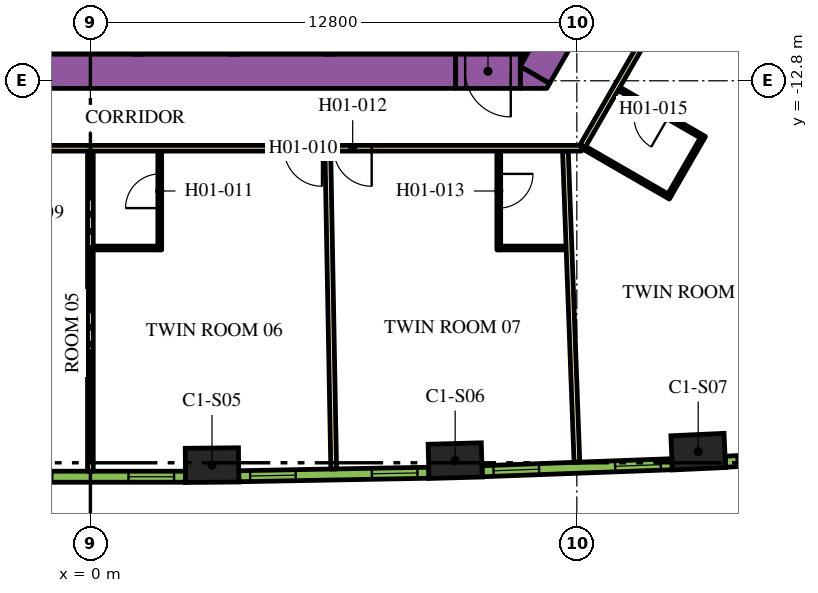
"""IFC4 building model, lengths in metres.
Left out: names, types, materials, properties, quantities, classifications, styles, units other than length and angle.
Written with IfcOpenShell. Run it as: python <this file> out.ifc"""

import sys

from ifc_helpers import new_model, si_unit, direction, frame, frame_2d, origin, origin_2d, place, context, subcontext, project, spatial, polyline, rectangle, outline, extrude, element, fill, save


model = new_model("IFC4")
c1 = context("Model", 3, precision=1e-05, world=origin(), true_north=direction((0.0, 1.0)))
c2 = subcontext(c1, "Body", "Model", "MODEL_VIEW")
j1 = project(units=[si_unit("LENGTHUNIT", "METRE"), si_unit("PLANEANGLEUNIT", "RADIAN")], contexts=[c1])
p1 = place(None, origin())
s1 = spatial("IfcSite", under=j1, at=p1, CompositionType="ELEMENT")
p2 = place(p1, origin())
s2 = spatial("IfcBuilding", under=s1, at=p2, CompositionType="ELEMENT")
p3 = place(p2, frame((0.0, 0.0, 35.4)))
s3 = spatial("IfcBuildingStorey", under=s2, at=p3, CompositionType="ELEMENT", Elevation=35.4)
for number, where, z_axis, x_axis in (
    (1, (3.2, -22.913, 0.0), (0.0, 0.0, 1.0), (1.0, 0.009, 0.0)),
    (2, (9.599, -22.795, 0.0), (0.0, 0.0, 1.0), (1.0, 0.028, 0.0)),
    (3, (15.994, -22.558, 0.0), (0.0, 0.0, 1.0), (0.999, 0.046, 0.0)),
):
    element("IfcColumn", number, at=place(p3, frame(where, z_axis=z_axis, x_axis=x_axis)), inside=s3, PredefinedType="COLUMN", context=c2, shape_type="SweptSolid", body=[
        extrude(rectangle(XDim=1.4, YDim=0.9, at=origin_2d()), origin(), (0.0, 0.0, 1.0), 3.9),
    ])
p4 = place(p3, frame((11.695, -12.644, 0.0), z_axis=(0.0, 0.0, 1.0), x_axis=(0.500010229568, 0.86601949766, 0.0)))
e4 = element("IfcWall", 4, at=p4, inside=s3, PredefinedType="SOLIDWALL", context=c2, shape_type="SweptSolid", body=[
    extrude(rectangle(XDim=9.326, YDim=0.9, at=frame_2d((4.663, 0.0))), origin(), (0.0, 0.0, 1.0), 3.9),
])
p5 = place(p3, origin())
e5 = element("IfcWall", 5, at=p5, inside=s3, PredefinedType="SOLIDWALL", context=c2, shape_type="SweptSolid", body=[
    extrude(outline(polyline([(12.009, -13.0), (11.312, -13.0), (11.312, -12.425), (12.083, -12.871), (12.009, -13.0)])), origin(), (0.0, 0.0, 1.0), 3.9),
])
e6 = element("IfcWall", 6, at=p5, inside=s3, PredefinedType="SOLIDWALL", context=c2, shape_type="SweptSolid", body=[
    extrude(outline(polyline([(11.489, -12.1), (11.312, -12.407), (11.312, -12.1), (11.489, -12.1)])), origin(), (0.0, 0.0, 1.0), 3.9),
])
p6 = place(p3, frame((-12.019, -12.55, 0.0), z_axis=(0.0, 0.0, 1.0), x_axis=(1.0, 0.0, 0.0)))
e7 = element("IfcWall", 7, at=p6, inside=s3, PredefinedType="SOLIDWALL", context=c2, shape_type="SweptSolid", body=[
    extrude(rectangle(XDim=21.63, YDim=0.9, at=frame_2d((10.815, 0.0))), origin(), (0.0, 0.0, 1.0), 3.9),
])
p7 = place(p3, frame((6.3, -8.67, 0.0), z_axis=(0.0, 0.0, 1.0), x_axis=(0.0, -1.0, 0.0)))
e8 = element("IfcWall", 8, at=p7, inside=s3, PredefinedType="SOLIDWALL", context=c2, shape_type="SweptSolid", body=[
    extrude(rectangle(XDim=3.43, YDim=0.25, at=frame_2d((1.715, 0.0))), origin(), (0.0, 0.0, 1.0), 3.9),
])
for number, where, z_axis, x_axis in (
    (9, (3.78, -12.1, 0.0), (0.0, 0.0, 1.0), (0.0, 1.0, 0.0)),
    (10, (1.26, -12.1, 0.0), (0.0, 0.0, 1.0), (0.0, 1.0, 0.0)),
):
    element("IfcWall", number, at=place(p3, frame(where, z_axis=z_axis, x_axis=x_axis)), inside=s3, PredefinedType="SOLIDWALL", context=c2, shape_type="SweptSolid", body=[
        extrude(rectangle(XDim=2.2, YDim=0.25, at=frame_2d((1.1, 0.0))), origin(), (0.0, 0.0, 1.0), 3.9),
    ])
p8 = place(p3, frame((11.312, -12.55, 0.0), z_axis=(0.0, 0.0, 1.0), x_axis=(-1.0, 0.0, 0.0)))
e11 = element("IfcWall", 11, at=p8, inside=s3, PredefinedType="SOLIDWALL", context=c2, shape_type="SweptSolid", body=[
    extrude(rectangle(XDim=1.7, YDim=0.9, at=frame_2d((0.85, 0.0))), origin(), (0.0, 0.0, 1.0), 3.9),
])
p9 = place(p8, frame((0.25, 0.0, 0.0)))
e12 = element("IfcOpeningElement", 12, at=p9, cuts=e11, PredefinedType="OPENING", context=c2, shape_type="SweptSolid", body=[
    extrude(rectangle(XDim=1.2, YDim=2.1, at=frame_2d((0.6, 1.05))), frame((0.0, 0.46, 0.0), z_axis=(0.0, -1.0, 0.0), x_axis=(1.0, 0.0, 0.0)), (0.0, 0.0, 1.0), 0.92),
])
p10 = place(p3, frame((16.412, -8.523, 0.0), z_axis=(0.0, 0.0, 1.0), x_axis=(0.866022197818, -0.500005552856, 0.0)))
e13 = element("IfcWall", 13, at=p10, inside=s3, PredefinedType="PARTITIONING", context=c2, shape_type="SweptSolid", body=[
    extrude(rectangle(XDim=16.224, YDim=0.15, at=frame_2d((8.112, 0.0))), origin(), (0.0, 0.0, 1.0), 2.75),
])
p11 = place(p10, frame((7.949, 0.0, 0.0)))
e14 = element("IfcOpeningElement", 14, at=p11, cuts=e13, PredefinedType="OPENING", context=c2, shape_type="SweptSolid", body=[
    extrude(rectangle(XDim=1.0, YDim=2.1, at=frame_2d((0.5, 1.05))), frame((0.0, 0.085, 0.0), z_axis=(0.0, -1.0, 0.0), x_axis=(1.0, 0.0, 0.0)), (0.0, 0.0, 1.0), 0.17),
])
p12 = place(p10, frame((0.526, 0.0, 0.0)))
e15 = element("IfcOpeningElement", 15, at=p12, cuts=e13, PredefinedType="OPENING", context=c2, shape_type="SweptSolid", body=[
    extrude(rectangle(XDim=1.0, YDim=2.1, at=frame_2d((0.5, 1.05))), frame((0.0, 0.085, 0.0), z_axis=(0.0, -1.0, 0.0), x_axis=(1.0, 0.0, 0.0)), (0.0, 0.0, 1.0), 0.17),
])
p13 = place(p3, frame((12.918, -14.575, 0.0), z_axis=(0.0, 0.0, 1.0), x_axis=(-1.0, 0.0, 0.0)))
e16 = element("IfcWall", 16, at=p13, inside=s3, PredefinedType="PARTITIONING", context=c2, shape_type="SweptSolid", body=[
    extrude(rectangle(XDim=25.766, YDim=0.15, at=frame_2d((12.883, 0.0))), origin(), (0.0, 0.0, 1.0), 2.75),
])
p14 = place(p13, frame((24.586, 0.0, 0.0)))
e17 = element("IfcOpeningElement", 17, at=p14, cuts=e16, PredefinedType="OPENING", context=c2, shape_type="SweptSolid", body=[
    extrude(rectangle(XDim=1.0, YDim=2.1, at=frame_2d((0.5, 1.05))), frame((0.0, 0.085, 0.0), z_axis=(0.0, -1.0, 0.0), x_axis=(1.0, 0.0, 0.0)), (0.0, 0.0, 1.0), 0.17),
])
p15 = place(p13, frame((16.195, 0.0, 0.0)))
e18 = element("IfcOpeningElement", 18, at=p15, cuts=e16, PredefinedType="OPENING", context=c2, shape_type="SweptSolid", body=[
    extrude(rectangle(XDim=1.0, YDim=2.1, at=frame_2d((0.5, 1.05))), frame((0.0, 0.085, 0.0), z_axis=(0.0, -1.0, 0.0), x_axis=(1.0, 0.0, 0.0)), (0.0, 0.0, 1.0), 0.17),
])
p16 = place(p13, frame((14.066, 0.0, 0.0)))
e19 = element("IfcOpeningElement", 19, at=p16, cuts=e16, PredefinedType="OPENING", context=c2, shape_type="SweptSolid", body=[
    extrude(rectangle(XDim=0.9, YDim=2.1, at=frame_2d((0.45, 1.05))), frame((0.0, 0.085, 0.0), z_axis=(0.0, -1.0, 0.0), x_axis=(1.0, 0.0, 0.0)), (0.0, 0.0, 1.0), 0.17),
])
p17 = place(p13, frame((6.824, 0.0, 0.0)))
e20 = element("IfcOpeningElement", 20, at=p17, cuts=e16, PredefinedType="OPENING", context=c2, shape_type="SweptSolid", body=[
    extrude(rectangle(XDim=1.0, YDim=2.1, at=frame_2d((0.5, 1.05))), frame((0.0, 0.085, 0.0), z_axis=(0.0, -1.0, 0.0), x_axis=(1.0, 0.0, 0.0)), (0.0, 0.0, 1.0), 0.17),
])
p18 = place(p13, frame((5.517, 0.0, 0.0)))
e21 = element("IfcOpeningElement", 21, at=p18, cuts=e16, PredefinedType="OPENING", context=c2, shape_type="SweptSolid", body=[
    extrude(rectangle(XDim=1.0, YDim=2.1, at=frame_2d((0.5, 1.05))), frame((0.0, 0.085, 0.0), z_axis=(0.0, -1.0, 0.0), x_axis=(1.0, 0.0, 0.0)), (0.0, 0.0, 1.0), 0.17),
])
p19 = place(p3, frame((15.587, -9.952, 0.0), z_axis=(0.0, 0.0, 1.0), x_axis=(-0.500016618951, -0.866015808616, 0.0)))
e22 = element("IfcWall", 22, at=p19, inside=s3, PredefinedType="PARTITIONING", context=c2, shape_type="SweptSolid", body=[
    extrude(rectangle(XDim=5.268, YDim=0.15, at=frame_2d((2.634, 0.0))), origin(), (0.0, 0.0, 1.0), 2.75),
])
p20 = place(p19, frame((0.225, 0.0, 0.0)))
e23 = element("IfcOpeningElement", 23, at=p20, cuts=e22, PredefinedType="OPENING", context=c2, shape_type="SweptSolid", body=[
    extrude(rectangle(XDim=1.0, YDim=2.1, at=frame_2d((0.5, 1.05))), frame((0.0, 0.085, 0.0), z_axis=(0.0, -1.0, 0.0), x_axis=(1.0, 0.0, 0.0)), (0.0, 0.0, 1.0), 0.17),
])
p21 = place(p3, frame((29.638, -18.064, 0.0), z_axis=(0.0, 0.0, 1.0), x_axis=(-0.866026175601, 0.499998663172, 0.0)))
e24 = element("IfcWall", 24, at=p21, inside=s3, PredefinedType="PARTITIONING", context=c2, shape_type="SweptSolid", body=[
    extrude(rectangle(XDim=16.144, YDim=0.15, at=frame_2d((8.072, 0.0))), origin(), (0.0, 0.0, 1.0), 2.75),
])
p22 = place(p21, frame((11.004, 0.0, 0.0)))
e25 = element("IfcOpeningElement", 25, at=p22, cuts=e24, PredefinedType="OPENING", context=c2, shape_type="SweptSolid", body=[
    extrude(rectangle(XDim=1.0, YDim=2.1, at=frame_2d((0.5, 1.05))), frame((0.0, 0.085, 0.0), z_axis=(0.0, -1.0, 0.0), x_axis=(1.0, 0.0, 0.0)), (0.0, 0.0, 1.0), 0.17),
])
p23 = place(p21, frame((7.275, 0.0, 0.0)))
e26 = element("IfcOpeningElement", 26, at=p23, cuts=e24, PredefinedType="OPENING", context=c2, shape_type="SweptSolid", body=[
    extrude(rectangle(XDim=1.0, YDim=2.1, at=frame_2d((0.5, 1.05))), frame((0.0, 0.085, 0.0), z_axis=(0.0, -1.0, 0.0), x_axis=(1.0, 0.0, 0.0)), (0.0, 0.0, 1.0), 0.17),
])
p24 = place(p3, frame((0.0, -23.073, 0.0), z_axis=(0.0, 0.0, 1.0), x_axis=(0.0, 1.0, 0.0)))
e27 = element("IfcWall", 27, at=p24, inside=s3, PredefinedType="PARTITIONING", context=c2, shape_type="SweptSolid", body=[
    extrude(rectangle(XDim=8.423, YDim=0.15, at=frame_2d((4.212, 0.0))), origin(), (0.0, 0.0, 1.0), 2.75),
])
p25 = place(p3, frame((6.402, -23.014, 0.0), z_axis=(0.0, 0.0, 1.0), x_axis=(-0.01849587109, 0.999828936745, 0.0)))
e28 = element("IfcWall", 28, at=p25, inside=s3, PredefinedType="PARTITIONING", context=c2, shape_type="SweptSolid", body=[
    extrude(rectangle(XDim=8.355, YDim=0.15, at=frame_2d((4.178, 0.0))), origin(), (0.0, 0.0, 1.0), 2.75),
])
p26 = place(p3, frame((12.802, -22.836, 0.0), z_axis=(0.0, 0.0, 1.0), x_axis=(-0.036969723281, 0.999316386116, 0.0)))
e29 = element("IfcWall", 29, at=p26, inside=s3, PredefinedType="PARTITIONING", context=c2, shape_type="SweptSolid", body=[
    extrude(rectangle(XDim=8.182, YDim=0.15, at=frame_2d((4.091, 0.0))), origin(), (0.0, 0.0, 1.0), 2.75),
])
p27 = place(p3, frame((1.825, -17.25, 0.0), z_axis=(0.0, 0.0, 1.0), x_axis=(0.0, 1.0, 0.0)))
e30 = element("IfcWall", 30, at=p27, inside=s3, PredefinedType="PARTITIONING", context=c2, shape_type="SweptSolid", body=[
    extrude(rectangle(XDim=2.6, YDim=0.1, at=frame_2d((1.3, 0.0))), origin(), (0.0, 0.0, 1.0), 2.75),
])
p28 = place(p27, frame((1.1, 0.0, 0.0)))
e31 = element("IfcOpeningElement", 31, at=p28, cuts=e30, PredefinedType="OPENING", context=c2, shape_type="SweptSolid", body=[
    extrude(rectangle(XDim=0.9, YDim=2.1, at=frame_2d((0.45, 1.05))), frame((0.0, 0.06, 0.0), z_axis=(0.0, -1.0, 0.0), x_axis=(1.0, 0.0, 0.0)), (0.0, 0.0, 1.0), 0.12),
])
p29 = place(p3, frame((1.775, -17.2, 0.0), z_axis=(0.0, 0.0, 1.0), x_axis=(-1.0, 0.0, 0.0)))
e32 = element("IfcWall", 32, at=p29, inside=s3, PredefinedType="PARTITIONING", context=c2, shape_type="SweptSolid", body=[
    extrude(rectangle(XDim=1.7, YDim=0.1, at=frame_2d((0.85, 0.0))), origin(), (0.0, 0.0, 1.0), 2.75),
])
p30 = place(p3, frame((10.746, -14.65, 0.0), z_axis=(0.0, 0.0, 1.0), x_axis=(0.0, -1.0, 0.0)))
e33 = element("IfcWall", 33, at=p30, inside=s3, PredefinedType="PARTITIONING", context=c2, shape_type="SweptSolid", body=[
    extrude(rectangle(XDim=2.6, YDim=0.1, at=frame_2d((1.3, 0.0))), origin(), (0.0, 0.0, 1.0), 2.75),
])
p31 = place(p30, frame((0.6, 0.0, 0.0)))
e34 = element("IfcOpeningElement", 34, at=p31, cuts=e33, PredefinedType="OPENING", context=c2, shape_type="SweptSolid", body=[
    extrude(rectangle(XDim=0.9, YDim=2.1, at=frame_2d((0.45, 1.05))), frame((0.0, 0.06, 0.0), z_axis=(0.0, -1.0, 0.0), x_axis=(1.0, 0.0, 0.0)), (0.0, 0.0, 1.0), 0.12),
])
p32 = place(p3, frame((10.806, -17.2, 0.0), z_axis=(0.0, 0.0, 1.0), x_axis=(1.0, 0.0, 0.0)))
e35 = element("IfcWall", 35, at=p32, inside=s3, PredefinedType="PARTITIONING", context=c2, shape_type="SweptSolid", body=[
    extrude(rectangle(XDim=1.71, YDim=0.1, at=frame_2d((0.855, 0.0))), origin(), (0.0, 0.0, 1.0), 2.75),
])
p33 = place(p3, frame((16.16, -14.31, 0.0), z_axis=(0.0, 0.0, 1.0), x_axis=(-0.866062058628, 0.499936506574, 0.0)))
e36 = element("IfcWall", 36, at=p33, inside=s3, PredefinedType="PARTITIONING", context=c2, shape_type="SweptSolid", body=[
    extrude(rectangle(XDim=2.6, YDim=0.1, at=frame_2d((1.3, 0.0))), origin(), (0.0, 0.0, 1.0), 2.75),
])
p34 = place(p33, frame((1.1, 0.0, 0.0)))
e37 = element("IfcOpeningElement", 37, at=p34, cuts=e36, PredefinedType="OPENING", context=c2, shape_type="SweptSolid", body=[
    extrude(rectangle(XDim=0.9, YDim=2.1, at=frame_2d((0.45, 1.05))), frame((0.0, 0.06, 0.0), z_axis=(0.0, -1.0, 0.0), x_axis=(1.0, 0.0, 0.0)), (0.0, 0.0, 1.0), 0.12),
])
p35 = place(p3, frame((16.092, -14.329, 0.0), z_axis=(0.0, 0.0, 1.0), x_axis=(-0.500062241894, -0.865989465428, 0.0)))
e38 = element("IfcWall", 38, at=p35, inside=s3, PredefinedType="PARTITIONING", context=c2, shape_type="SweptSolid", body=[
    extrude(rectangle(XDim=1.7, YDim=0.1, at=frame_2d((0.85, 0.0))), origin(), (0.0, 0.0, 1.0), 2.75),
])
p36 = place(p3, frame((13.008, -14.569, 0.0), z_axis=(0.0, 0.0, 1.0), x_axis=(0.865997922154, -0.500047596559, 0.0)))
e39 = element("IfcWall", 39, at=p36, inside=s3, PredefinedType="PARTITIONING", context=c2, shape_type="SweptSolid", body=[
    extrude(rectangle(XDim=2.6, YDim=0.1, at=frame_2d((1.3, 0.0))), origin(), (0.0, 0.0, 1.0), 2.75),
])
p37 = place(p3, frame((-2.499, -23.218, 0.0), z_axis=(0.0, 0.0, 1.0), x_axis=(1.0, 0.0, 0.0)))
e40 = element("IfcWall", 40, at=p37, inside=s3, PredefinedType="SOLIDWALL", context=c2, shape_type="SweptSolid", body=[
    extrude(rectangle(XDim=4.998, YDim=0.29, at=frame_2d((2.499, 0.0))), origin(), (0.0, 0.0, 1.0), 3.65),
])
p38 = place(p37, frame((0.297, 0.0, 0.9)))
e41 = element("IfcOpeningElement", 41, at=p38, cuts=e40, PredefinedType="OPENING", context=c2, shape_type="SweptSolid", body=[
    extrude(rectangle(XDim=1.2, YDim=2.15, at=frame_2d((0.6, 1.075))), frame((0.0, 0.155, 0.0), z_axis=(0.0, -1.0, 0.0), x_axis=(1.0, 0.0, 0.0)), (0.0, 0.0, 1.0), 0.31),
])
p39 = place(p37, frame((3.501, 0.0, 0.9)))
e42 = element("IfcOpeningElement", 42, at=p39, cuts=e40, PredefinedType="OPENING", context=c2, shape_type="SweptSolid", body=[
    extrude(rectangle(XDim=1.2, YDim=2.15, at=frame_2d((0.6, 1.075))), frame((0.0, 0.155, 0.0), z_axis=(0.0, -1.0, 0.0), x_axis=(1.0, 0.0, 0.0)), (0.0, 0.0, 1.0), 0.31),
])
p40 = place(p3, frame((3.906, -23.205, 0.0), z_axis=(0.0, 0.0, 1.0), x_axis=(0.999829529479, 0.018463801951, 0.0)))
e43 = element("IfcWall", 43, at=p40, inside=s3, PredefinedType="SOLIDWALL", context=c2, shape_type="SweptSolid", body=[
    extrude(rectangle(XDim=4.998, YDim=0.29, at=frame_2d((2.499, 0.0))), origin(), (0.0, 0.0, 1.0), 3.65),
])
p41 = place(p40, frame((0.297, 0.0, 0.9)))
e44 = element("IfcOpeningElement", 44, at=p41, cuts=e43, PredefinedType="OPENING", context=c2, shape_type="SweptSolid", body=[
    extrude(rectangle(XDim=1.2, YDim=2.15, at=frame_2d((0.6, 1.075))), frame((0.0, 0.155, 0.0), z_axis=(0.0, -1.0, 0.0), x_axis=(1.0, 0.0, 0.0)), (0.0, 0.0, 1.0), 0.31),
])
p42 = place(p40, frame((3.501, 0.0, 0.9)))
e45 = element("IfcOpeningElement", 45, at=p42, cuts=e43, PredefinedType="OPENING", context=c2, shape_type="SweptSolid", body=[
    extrude(rectangle(XDim=1.2, YDim=2.15, at=frame_2d((0.6, 1.075))), frame((0.0, 0.155, 0.0), z_axis=(0.0, -1.0, 0.0), x_axis=(1.0, 0.0, 0.0)), (0.0, 0.0, 1.0), 0.31),
])
p43 = place(p3, frame((10.31, -23.074, 0.0), z_axis=(0.0, 0.0, 1.0), x_axis=(0.999317974969, 0.036926750529, 0.0)))
e46 = element("IfcWall", 46, at=p43, inside=s3, PredefinedType="SOLIDWALL", context=c2, shape_type="SweptSolid", body=[
    extrude(rectangle(XDim=4.998, YDim=0.29, at=frame_2d((2.499, 0.0))), origin(), (0.0, 0.0, 1.0), 3.65),
])
p44 = place(p43, frame((0.297, 0.0, 0.9)))
e47 = element("IfcOpeningElement", 47, at=p44, cuts=e46, PredefinedType="OPENING", context=c2, shape_type="SweptSolid", body=[
    extrude(rectangle(XDim=1.2, YDim=2.15, at=frame_2d((0.6, 1.075))), frame((0.0, 0.155, 0.0), z_axis=(0.0, -1.0, 0.0), x_axis=(1.0, 0.0, 0.0)), (0.0, 0.0, 1.0), 0.31),
])
p45 = place(p43, frame((3.501, 0.0, 0.9)))
e48 = element("IfcOpeningElement", 48, at=p45, cuts=e46, PredefinedType="OPENING", context=c2, shape_type="SweptSolid", body=[
    extrude(rectangle(XDim=1.2, YDim=2.15, at=frame_2d((0.6, 1.075))), frame((0.0, 0.155, 0.0), z_axis=(0.0, -1.0, 0.0), x_axis=(1.0, 0.0, 0.0)), (0.0, 0.0, 1.0), 0.31),
])
p46 = place(p3, frame((16.711, -22.824, 0.0), z_axis=(0.0, 0.0, 1.0), x_axis=(0.998464708705, 0.055391564976, 0.0)))
e49 = element("IfcWall", 49, at=p46, inside=s3, PredefinedType="SOLIDWALL", context=c2, shape_type="SweptSolid", body=[
    extrude(rectangle(XDim=4.998, YDim=0.29, at=frame_2d((2.499, 0.0))), origin(), (0.0, 0.0, 1.0), 3.65),
])
p47 = place(p46, frame((0.297, 0.0, 0.9)))
e50 = element("IfcOpeningElement", 50, at=p47, cuts=e49, PredefinedType="OPENING", context=c2, shape_type="SweptSolid", body=[
    extrude(rectangle(XDim=1.2, YDim=2.15, at=frame_2d((0.6, 1.075))), frame((0.0, 0.155, 0.0), z_axis=(0.0, -1.0, 0.0), x_axis=(1.0, 0.0, 0.0)), (0.0, 0.0, 1.0), 0.31),
])
p48 = place(p46, frame((3.501, 0.0, 0.9)))
e51 = element("IfcOpeningElement", 51, at=p48, cuts=e49, PredefinedType="OPENING", context=c2, shape_type="SweptSolid", body=[
    extrude(rectangle(XDim=1.2, YDim=2.15, at=frame_2d((0.6, 1.075))), frame((0.0, 0.155, 0.0), z_axis=(0.0, -1.0, 0.0), x_axis=(1.0, 0.0, 0.0)), (0.0, 0.0, 1.0), 0.31),
])
p49 = place(p9, origin())
e52 = element("IfcDoor", 52, at=p49, inside=s3, OperationType="SINGLE_SWING_LEFT", PredefinedType="DOOR", context=c2, shape_type="SweptSolid", body=[
    extrude(rectangle(XDim=1.2, YDim=2.1, at=frame_2d((0.6, 1.05))), frame((0.0, 0.025, 0.0), z_axis=(0.0, -1.0, 0.0), x_axis=(1.0, 0.0, 0.0)), (0.0, 0.0, 1.0), 0.05),
])
fill(e12, e52)
p50 = place(p17, origin())
e53 = element("IfcDoor", 53, at=p50, inside=s3, OperationType="SINGLE_SWING_LEFT", PredefinedType="DOOR", context=c2, shape_type="SweptSolid", body=[
    extrude(rectangle(XDim=1.0, YDim=2.1, at=frame_2d((0.5, 1.05))), frame((0.0, 0.025, 0.0), z_axis=(0.0, -1.0, 0.0), x_axis=(1.0, 0.0, 0.0)), (0.0, 0.0, 1.0), 0.05),
])
fill(e20, e53)
p51 = place(p28, origin())
e54 = element("IfcDoor", 54, at=p51, inside=s3, OperationType="SINGLE_SWING_RIGHT", PredefinedType="DOOR", context=c2, shape_type="SweptSolid", body=[
    extrude(rectangle(XDim=0.9, YDim=2.1, at=frame_2d((0.45, 1.05))), frame((0.0, 0.025, 0.0), z_axis=(0.0, -1.0, 0.0), x_axis=(1.0, 0.0, 0.0)), (0.0, 0.0, 1.0), 0.05),
])
fill(e31, e54)
p52 = place(p18, origin())
e55 = element("IfcDoor", 55, at=p52, inside=s3, OperationType="SINGLE_SWING_RIGHT", PredefinedType="DOOR", context=c2, shape_type="SweptSolid", body=[
    extrude(rectangle(XDim=1.0, YDim=2.1, at=frame_2d((0.5, 1.05))), frame((0.0, 0.025, 0.0), z_axis=(0.0, -1.0, 0.0), x_axis=(1.0, 0.0, 0.0)), (0.0, 0.0, 1.0), 0.05),
])
fill(e21, e55)
p53 = place(p31, origin())
e56 = element("IfcDoor", 56, at=p53, inside=s3, OperationType="SINGLE_SWING_LEFT", PredefinedType="DOOR", context=c2, shape_type="SweptSolid", body=[
    extrude(rectangle(XDim=0.9, YDim=2.1, at=frame_2d((0.45, 1.05))), frame((0.0, 0.025, 0.0), z_axis=(0.0, -1.0, 0.0), x_axis=(1.0, 0.0, 0.0)), (0.0, 0.0, 1.0), 0.05),
])
fill(e34, e56)
p54 = place(p34, origin())
e57 = element("IfcDoor", 57, at=p54, inside=s3, OperationType="SINGLE_SWING_LEFT", PredefinedType="DOOR", context=c2, shape_type="SweptSolid", body=[
    extrude(rectangle(XDim=0.9, YDim=2.1, at=frame_2d((0.45, 1.05))), frame((0.0, 0.025, 0.0), z_axis=(0.0, -1.0, 0.0), x_axis=(1.0, 0.0, 0.0)), (0.0, 0.0, 1.0), 0.05),
])
fill(e37, e57)
p55 = place(p39, origin())
e58 = element("IfcWindow", 58, at=p55, inside=s3, PartitioningType="DOUBLE_PANEL_VERTICAL", PredefinedType="WINDOW", context=c2, shape_type="SweptSolid", body=[
    extrude(rectangle(XDim=1.2, YDim=2.15, at=frame_2d((0.6, 1.075))), frame((0.0, 0.015, 0.0), z_axis=(0.0, -1.0, 0.0), x_axis=(1.0, 0.0, 0.0)), (0.0, 0.0, 1.0), 0.06),
])
fill(e42, e58)
p56 = place(p41, origin())
e59 = element("IfcWindow", 59, at=p56, inside=s3, PartitioningType="DOUBLE_PANEL_VERTICAL", PredefinedType="WINDOW", context=c2, shape_type="SweptSolid", body=[
    extrude(rectangle(XDim=1.2, YDim=2.15, at=frame_2d((0.6, 1.075))), frame((0.0, 0.015, 0.0), z_axis=(0.0, -1.0, 0.0), x_axis=(1.0, 0.0, 0.0)), (0.0, 0.0, 1.0), 0.06),
])
fill(e44, e59)
p57 = place(p42, origin())
e60 = element("IfcWindow", 60, at=p57, inside=s3, PartitioningType="DOUBLE_PANEL_VERTICAL", PredefinedType="WINDOW", context=c2, shape_type="SweptSolid", body=[
    extrude(rectangle(XDim=1.2, YDim=2.15, at=frame_2d((0.6, 1.075))), frame((0.0, 0.015, 0.0), z_axis=(0.0, -1.0, 0.0), x_axis=(1.0, 0.0, 0.0)), (0.0, 0.0, 1.0), 0.06),
])
fill(e45, e60)
p58 = place(p44, origin())
e61 = element("IfcWindow", 61, at=p58, inside=s3, PartitioningType="DOUBLE_PANEL_VERTICAL", PredefinedType="WINDOW", context=c2, shape_type="SweptSolid", body=[
    extrude(rectangle(XDim=1.2, YDim=2.15, at=frame_2d((0.6, 1.075))), frame((0.0, 0.015, 0.0), z_axis=(0.0, -1.0, 0.0), x_axis=(1.0, 0.0, 0.0)), (0.0, 0.0, 1.0), 0.06),
])
fill(e47, e61)
p59 = place(p45, origin())
e62 = element("IfcWindow", 62, at=p59, inside=s3, PartitioningType="DOUBLE_PANEL_VERTICAL", PredefinedType="WINDOW", context=c2, shape_type="SweptSolid", body=[
    extrude(rectangle(XDim=1.2, YDim=2.15, at=frame_2d((0.6, 1.075))), frame((0.0, 0.015, 0.0), z_axis=(0.0, -1.0, 0.0), x_axis=(1.0, 0.0, 0.0)), (0.0, 0.0, 1.0), 0.06),
])
fill(e48, e62)
p60 = place(p47, origin())
e63 = element("IfcWindow", 63, at=p60, inside=s3, PartitioningType="DOUBLE_PANEL_VERTICAL", PredefinedType="WINDOW", context=c2, shape_type="SweptSolid", body=[
    extrude(rectangle(XDim=1.2, YDim=2.15, at=frame_2d((0.6, 1.075))), frame((0.0, 0.015, 0.0), z_axis=(0.0, -1.0, 0.0), x_axis=(1.0, 0.0, 0.0)), (0.0, 0.0, 1.0), 0.06),
])
fill(e50, e63)
save(model, sys.argv[1])
